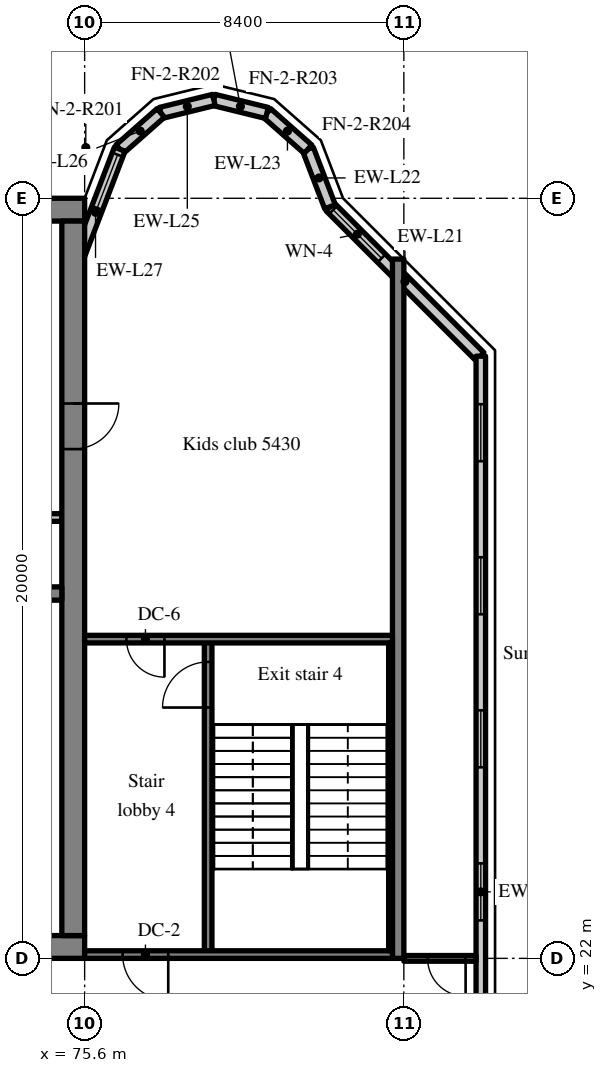
"""IFC4 building model, lengths in metres.
Left out: names, types, materials, properties, quantities, classifications, styles, units other than length and angle.
Written with IfcOpenShell. Run it as: python <this file> out.ifc"""

import sys

from ifc_helpers import new_model, si_unit, direction, frame, frame_2d, origin, place, context, subcontext, project, spatial, rectangle, extrude, source, transform, mapped, element, fill, save


model = new_model("IFC4")
c1 = context("Model", 3, precision=1e-05, world=origin(), true_north=direction((0.0, 1.0)))
c2 = subcontext(c1, "Body", "Model", "MODEL_VIEW")
j1 = project(units=[si_unit("LENGTHUNIT", "METRE"), si_unit("PLANEANGLEUNIT", "RADIAN")], contexts=[c1])
p1 = place(None, origin())
s1 = spatial("IfcSite", under=j1, at=p1, CompositionType="ELEMENT")
p2 = place(p1, origin())
s2 = spatial("IfcBuilding", under=s1, at=p2, CompositionType="ELEMENT")
p3 = place(p2, frame((0.0, 0.0, 225.7)))
s3 = spatial("IfcBuildingStorey", under=s2, at=p3, CompositionType="ELEMENT", Elevation=225.7)
m1 = source(origin(), c2, "Body", "SweptSolid", [
    extrude(rectangle(XDim=50.4, YDim=0.6, at=frame_2d((25.2, 0.0))), origin(), (0.0, 0.0, 1.0), 3.62),
])
p4 = place(p3, frame((25.2, 22.3, 0.0), z_axis=(0.0, 0.0, 1.0), x_axis=(1.0, 0.0, 0.0)))
e1 = element("IfcWall", 1, at=p4, inside=s3, PredefinedType="SHEAR", context=c2, shape_type="MappedRepresentation", body=[
    mapped(m1, transform((0.0, 0.0, 0.0), scale=1.0)),
])
m2 = source(origin(), c2, "Body", "SweptSolid", [
    extrude(rectangle(XDim=1.8, YDim=2.1, at=frame_2d((0.9, 1.05))), frame((0.0, 0.31, 0.0), z_axis=(0.0, -1.0, 0.0), x_axis=(1.0, 0.0, 0.0)), (0.0, 0.0, 1.0), 0.62),
])
p5 = place(p4, frame((15.9, 0.0, 0.0)))
e2 = element("IfcOpeningElement", 2, at=p5, cuts=e1, PredefinedType="OPENING", context=c2, shape_type="MappedRepresentation", body=[
    mapped(m2, transform((0.0, 0.0, 0.0), scale=1.0)),
])
m3 = source(origin(), c2, "Body", "SweptSolid", [
    extrude(rectangle(XDim=0.9, YDim=2.1, at=frame_2d((0.45, 1.05))), frame((0.0, 0.31, 0.0), z_axis=(0.0, -1.0, 0.0), x_axis=(1.0, 0.0, 0.0)), (0.0, 0.0, 1.0), 0.62),
])
p6 = place(p4, frame((11.187, 0.0, 0.0)))
e3 = element("IfcOpeningElement", 3, at=p6, cuts=e1, PredefinedType="OPENING", context=c2, shape_type="MappedRepresentation", body=[
    mapped(m3, transform((0.0, 0.0, 0.0), scale=1.0)),
])
p7 = place(p4, frame((21.513, 0.0, 0.0)))
e4 = element("IfcOpeningElement", 4, at=p7, cuts=e1, PredefinedType="OPENING", context=c2, shape_type="MappedRepresentation", body=[
    mapped(m3, transform((0.0, 0.0, 0.0), scale=1.0)),
])
p8 = place(p4, frame((32.7, 0.0, 0.0)))
e5 = element("IfcOpeningElement", 5, at=p8, cuts=e1, PredefinedType="OPENING", context=c2, shape_type="MappedRepresentation", body=[
    mapped(m2, transform((0.0, 0.0, 0.0), scale=1.0)),
])
m4 = source(origin(), c2, "Body", "SweptSolid", [
    extrude(rectangle(XDim=1.2, YDim=2.1, at=frame_2d((0.6, 1.05))), frame((0.0, 0.31, 0.0), z_axis=(0.0, -1.0, 0.0), x_axis=(1.0, 0.0, 0.0)), (0.0, 0.0, 1.0), 0.62),
])
p9 = place(p4, frame((6.488, 0.0, 0.0)))
e6 = element("IfcOpeningElement", 6, at=p9, cuts=e1, PredefinedType="OPENING", context=c2, shape_type="MappedRepresentation", body=[
    mapped(m4, transform((0.0, 0.0, 0.0), scale=1.0)),
])
p10 = place(p4, frame((47.925, 0.0, 0.0)))
e7 = element("IfcOpeningElement", 7, at=p10, cuts=e1, PredefinedType="OPENING", context=c2, shape_type="MappedRepresentation", body=[
    mapped(m4, transform((0.0, 0.0, 0.0), scale=1.0)),
])
p11 = place(p3, frame((25.2, 41.7, 0.0), z_axis=(0.0, 0.0, 1.0), x_axis=(1.0, 0.0, 0.0)))
e8 = element("IfcWall", 8, at=p11, inside=s3, PredefinedType="SHEAR", context=c2, shape_type="MappedRepresentation", body=[
    mapped(m1, transform((0.0, 0.0, 0.0), scale=1.0)),
])
m5 = source(origin(), c2, "Body", "SweptSolid", [
    extrude(rectangle(XDim=18.8, YDim=0.6, at=frame_2d((9.4, 0.0))), origin(), (0.0, 0.0, 1.0), 3.62),
])
p12 = place(p3, frame((75.3, 22.6, 0.0), z_axis=(0.0, 0.0, 1.0), x_axis=(0.0, 1.0, 0.0)))
e9 = element("IfcWall", 9, at=p12, inside=s3, PredefinedType="SHEAR", context=c2, shape_type="MappedRepresentation", body=[
    mapped(m5, transform((0.0, 0.0, 0.0), scale=1.0)),
])
p13 = place(p12, frame((12.8, 0.0, 0.0)))
e10 = element("IfcOpeningElement", 10, at=p13, cuts=e9, PredefinedType="OPENING", context=c2, shape_type="MappedRepresentation", body=[
    mapped(m4, transform((0.0, 0.0, 0.0), scale=1.0)),
])
m6 = source(origin(), c2, "Body", "SweptSolid", [
    extrude(rectangle(XDim=7.625, YDim=0.35, at=frame_2d((3.812, 0.0))), origin(), (0.0, 0.0, 1.0), 3.62),
])
p14 = place(p3, frame((67.375, 31.6, 0.0), z_axis=(0.0, 0.0, 1.0), x_axis=(1.0, 0.0, 0.0)))
e11 = element("IfcWall", 11, at=p14, inside=s3, PredefinedType="SHEAR", context=c2, shape_type="MappedRepresentation", body=[
    mapped(m6, transform((0.0, 0.0, 0.0), scale=1.0)),
])
m7 = source(origin(), c2, "Body", "SweptSolid", [
    extrude(rectangle(XDim=1.1, YDim=2.1, at=frame_2d((0.55, 1.05))), frame((0.0, 0.185, 0.0), z_axis=(0.0, -1.0, 0.0), x_axis=(1.0, 0.0, 0.0)), (0.0, 0.0, 1.0), 0.37),
])
p15 = place(p14, frame((5.8, 0.0, 0.0)))
e12 = element("IfcOpeningElement", 12, at=p15, cuts=e11, PredefinedType="OPENING", context=c2, shape_type="MappedRepresentation", body=[
    mapped(m7, transform((0.0, 0.0, 0.0), scale=1.0)),
])
m8 = source(origin(), c2, "Body", "SweptSolid", [
    extrude(rectangle(XDim=18.4, YDim=0.3, at=frame_2d((9.2, 0.0))), origin(), (0.0, 0.0, 1.0), 3.62),
])
p16 = place(p3, frame((83.85, 22.0, 0.0), z_axis=(0.0, 0.0, 1.0), x_axis=(0.0, 1.0, 0.0)))
e13 = element("IfcWall", 13, at=p16, inside=s3, PredefinedType="SHEAR", context=c2, shape_type="MappedRepresentation", body=[
    mapped(m8, transform((0.0, 0.0, 0.0), scale=1.0)),
])
m9 = source(origin(), c2, "Body", "SweptSolid", [
    extrude(rectangle(XDim=5.576, YDim=0.3, at=frame_2d((2.788, 0.0))), origin(), (0.0, 0.0, 1.0), 3.62),
])
p17 = place(p3, frame((86.0, 37.834, 0.0), z_axis=(0.0, 0.0, 1.0), x_axis=(-0.707106781187, 0.707106781187, 0.0)))
e14 = element("IfcWall", 14, at=p17, inside=s3, PredefinedType="SOLIDWALL", context=c2, shape_type="MappedRepresentation", body=[
    mapped(m9, transform((0.0, 0.0, 0.0), scale=1.0)),
])
m10 = source(origin(), c2, "Body", "SweptSolid", [
    extrude(rectangle(XDim=1.8, YDim=1.5, at=frame_2d((0.9, 0.75))), frame((0.0, 0.16, 0.0), z_axis=(0.0, -1.0, 0.0), x_axis=(1.0, 0.0, 0.0)), (0.0, 0.0, 1.0), 0.32),
])
p18 = place(p17, frame((3.658, 0.0, 0.9)))
e15 = element("IfcOpeningElement", 15, at=p18, cuts=e14, PredefinedType="OPENING", context=c2, shape_type="MappedRepresentation", body=[
    mapped(m10, transform((0.0, 0.0, 0.0), scale=1.0)),
])
m11 = source(origin(), c2, "Body", "SweptSolid", [
    extrude(rectangle(XDim=1.622, YDim=0.3, at=frame_2d((0.811, 0.0))), origin(), (0.0, 0.0, 1.0), 3.62),
])
p19 = place(p3, frame((82.057, 41.777, 0.0), z_axis=(0.0, 0.0, 1.0), x_axis=(-0.357778527068, 0.933806471154, 0.0)))
e16 = element("IfcWall", 16, at=p19, inside=s3, PredefinedType="SOLIDWALL", context=c2, shape_type="MappedRepresentation", body=[
    mapped(m11, transform((0.0, 0.0, 0.0), scale=1.0)),
])
m12 = source(origin(), c2, "Body", "SweptSolid", [
    extrude(rectangle(XDim=1.44, YDim=0.3, at=frame_2d((0.72, 0.0))), origin(), (0.0, 0.0, 1.0), 3.62),
])
p20 = place(p3, frame((81.477, 43.292, 0.0), z_axis=(0.0, 0.0, 1.0), x_axis=(-0.74957555648, 0.661918790432, 0.0)))
e17 = element("IfcWall", 17, at=p20, inside=s3, PredefinedType="SOLIDWALL", context=c2, shape_type="MappedRepresentation", body=[
    mapped(m12, transform((0.0, 0.0, 0.0), scale=1.0)),
])
m13 = source(origin(), c2, "Body", "SweptSolid", [
    extrude(rectangle(XDim=1.439, YDim=0.3, at=frame_2d((0.719, 0.0))), origin(), (0.0, 0.0, 1.0), 3.62),
])
for number, where, z_axis, x_axis in (
    (18, (80.397, 44.245, 0.0), (0.0, 0.0, 1.0), (-0.971, 0.238, 0.0)),
    (19, (79.0, 44.588, 0.0), (0.0, 0.0, 1.0), (-0.971, -0.238, 0.0)),
):
    element("IfcWall", number, at=place(p3, frame(where, z_axis=z_axis, x_axis=x_axis)), inside=s3, PredefinedType="SOLIDWALL", context=c2, shape_type="MappedRepresentation", body=[
        mapped(m13, transform((0.0, 0.0, 0.0), scale=1.0)),
    ])
p21 = place(p3, frame((77.603, 44.245, 0.0), z_axis=(0.0, 0.0, 1.0), x_axis=(-0.74957555648, -0.661918790432, 0.0)))
e20 = element("IfcWall", 20, at=p21, inside=s3, PredefinedType="SOLIDWALL", context=c2, shape_type="MappedRepresentation", body=[
    mapped(m12, transform((0.0, 0.0, 0.0), scale=1.0)),
])
m14 = source(origin(), c2, "Body", "SweptSolid", [
    extrude(rectangle(XDim=3.559, YDim=0.3, at=frame_2d((1.78, 0.0))), origin(), (0.0, 0.0, 1.0), 3.62),
])
p22 = place(p3, frame((76.523, 43.292, 0.0), z_axis=(0.0, 0.0, 1.0), x_axis=(-0.35779745313, -0.933799219604, 0.0)))
e21 = element("IfcWall", 21, at=p22, inside=s3, PredefinedType="SOLIDWALL", context=c2, shape_type="MappedRepresentation", body=[
    mapped(m14, transform((0.0, 0.0, 0.0), scale=1.0)),
])
m15 = source(origin(), c2, "Body", "SweptSolid", [
    extrude(rectangle(XDim=1.5, YDim=2.0, at=frame_2d((0.75, 1.0))), frame((0.0, 0.16, 0.0), z_axis=(0.0, -1.0, 0.0), x_axis=(1.0, 0.0, 0.0)), (0.0, 0.0, 1.0), 0.32),
])
p23 = place(p22, frame((0.156, 0.0, 0.9)))
e22 = element("IfcOpeningElement", 22, at=p23, cuts=e21, PredefinedType="OPENING", context=c2, shape_type="MappedRepresentation", body=[
    mapped(m15, transform((0.0, 0.0, 0.0), scale=1.0)),
])
m16 = source(origin(), c2, "Body", "SweptSolid", [
    extrude(rectangle(XDim=28.189, YDim=0.25, at=frame_2d((14.095, 0.0))), origin(), (0.0, 0.0, 1.0), 3.62),
])
p24 = place(p3, frame((86.025, 9.655, 0.0), z_axis=(0.0, 0.0, 1.0), x_axis=(0.0, 1.0, 0.0)))
e23 = element("IfcWall", 23, at=p24, inside=s3, PredefinedType="SOLIDWALL", context=c2, shape_type="MappedRepresentation", body=[
    mapped(m16, transform((0.0, 0.0, 0.0), scale=1.0)),
])
m17 = source(origin(), c2, "Body", "SweptSolid", [
    extrude(rectangle(XDim=1.5, YDim=1.5, at=frame_2d((0.75, 0.75))), frame((0.0, 0.135, 0.0), z_axis=(0.0, -1.0, 0.0), x_axis=(1.0, 0.0, 0.0)), (0.0, 0.0, 1.0), 0.27),
])
p25 = place(p24, frame((1.263, 0.0, 0.9)))
e24 = element("IfcOpeningElement", 24, at=p25, cuts=e23, PredefinedType="OPENING", context=c2, shape_type="MappedRepresentation", body=[
    mapped(m17, transform((0.0, 0.0, 0.0), scale=1.0)),
])
p26 = place(p24, frame((5.291, 0.0, 0.9)))
e25 = element("IfcOpeningElement", 25, at=p26, cuts=e23, PredefinedType="OPENING", context=c2, shape_type="MappedRepresentation", body=[
    mapped(m17, transform((0.0, 0.0, 0.0), scale=1.0)),
])
p27 = place(p24, frame((9.318, 0.0, 0.9)))
e26 = element("IfcOpeningElement", 26, at=p27, cuts=e23, PredefinedType="OPENING", context=c2, shape_type="MappedRepresentation", body=[
    mapped(m17, transform((0.0, 0.0, 0.0), scale=1.0)),
])
p28 = place(p24, frame((13.345, 0.0, 0.9)))
e27 = element("IfcOpeningElement", 27, at=p28, cuts=e23, PredefinedType="OPENING", context=c2, shape_type="MappedRepresentation", body=[
    mapped(m17, transform((0.0, 0.0, 0.0), scale=1.0)),
])
p29 = place(p24, frame((17.372, 0.0, 0.9)))
e28 = element("IfcOpeningElement", 28, at=p29, cuts=e23, PredefinedType="OPENING", context=c2, shape_type="MappedRepresentation", body=[
    mapped(m17, transform((0.0, 0.0, 0.0), scale=1.0)),
])
p30 = place(p24, frame((21.399, 0.0, 0.9)))
e29 = element("IfcOpeningElement", 29, at=p30, cuts=e23, PredefinedType="OPENING", context=c2, shape_type="MappedRepresentation", body=[
    mapped(m17, transform((0.0, 0.0, 0.0), scale=1.0)),
])
p31 = place(p24, frame((25.426, 0.0, 0.9)))
e30 = element("IfcOpeningElement", 30, at=p31, cuts=e23, PredefinedType="OPENING", context=c2, shape_type="MappedRepresentation", body=[
    mapped(m17, transform((0.0, 0.0, 0.0), scale=1.0)),
])
m18 = source(origin(), c2, "Body", "SweptSolid", [
    extrude(rectangle(XDim=2.55, YDim=0.2, at=frame_2d((1.275, 0.0))), origin(), (0.0, 0.0, 1.0), 3.62),
])
p32 = place(p3, frame((72.45, 33.6, 0.0), z_axis=(0.0, 0.0, 1.0), x_axis=(1.0, 0.0, 0.0)))
e31 = element("IfcWall", 31, at=p32, inside=s3, PredefinedType="SOLIDWALL", context=c2, shape_type="MappedRepresentation", body=[
    mapped(m18, transform((0.0, 0.0, 0.0), scale=1.0)),
])
m19 = source(origin(), c2, "Body", "SweptSolid", [
    extrude(rectangle(XDim=8.3, YDim=0.2, at=frame_2d((4.15, 0.0))), origin(), (0.0, 0.0, 1.0), 3.62),
])
p33 = place(p3, frame((78.85, 22.1, 0.0), z_axis=(0.0, 0.0, 1.0), x_axis=(0.0, 1.0, 0.0)))
e32 = element("IfcWall", 32, at=p33, inside=s3, PredefinedType="SOLIDWALL", context=c2, shape_type="MappedRepresentation", body=[
    mapped(m19, transform((0.0, 0.0, 0.0), scale=1.0)),
])
m20 = source(origin(), c2, "Body", "SweptSolid", [
    extrude(rectangle(XDim=1.2, YDim=2.1, at=frame_2d((0.6, 1.05))), frame((0.0, 0.11, 0.0), z_axis=(0.0, -1.0, 0.0), x_axis=(1.0, 0.0, 0.0)), (0.0, 0.0, 1.0), 0.22),
])
p34 = place(p33, frame((6.5, 0.0, 0.0)))
e33 = element("IfcOpeningElement", 33, at=p34, cuts=e32, PredefinedType="OPENING", context=c2, shape_type="MappedRepresentation", body=[
    mapped(m20, transform((0.0, 0.0, 0.0), scale=1.0)),
])
m21 = source(origin(), c2, "Body", "SweptSolid", [
    extrude(rectangle(XDim=8.1, YDim=0.2, at=frame_2d((4.05, 0.0))), origin(), (0.0, 0.0, 1.0), 3.62),
])
p35 = place(p3, frame((83.7, 22.1, 0.0), z_axis=(0.0, 0.0, 1.0), x_axis=(-1.0, 0.0, 0.0)))
e34 = element("IfcWall", 34, at=p35, inside=s3, PredefinedType="SOLIDWALL", context=c2, shape_type="MappedRepresentation", body=[
    mapped(m21, transform((0.0, 0.0, 0.0), scale=1.0)),
])
p36 = place(p35, frame((5.9, 0.0, 0.0)))
e35 = element("IfcOpeningElement", 35, at=p36, cuts=e34, PredefinedType="OPENING", context=c2, shape_type="MappedRepresentation", body=[
    mapped(m20, transform((0.0, 0.0, 0.0), scale=1.0)),
])
p37 = place(p3, frame((83.7, 30.4, 0.0), z_axis=(0.0, 0.0, 1.0), x_axis=(-1.0, 0.0, 0.0)))
e36 = element("IfcWall", 36, at=p37, inside=s3, PredefinedType="SOLIDWALL", context=c2, shape_type="MappedRepresentation", body=[
    mapped(m21, transform((0.0, 0.0, 0.0), scale=1.0)),
])
m22 = source(origin(), c2, "Body", "SweptSolid", [
    extrude(rectangle(XDim=1.0, YDim=2.1, at=frame_2d((0.5, 1.05))), frame((0.0, 0.11, 0.0), z_axis=(0.0, -1.0, 0.0), x_axis=(1.0, 0.0, 0.0)), (0.0, 0.0, 1.0), 0.22),
])
p38 = place(p37, frame((6.0, 0.0, 0.0)))
e37 = element("IfcOpeningElement", 37, at=p38, cuts=e36, PredefinedType="OPENING", context=c2, shape_type="MappedRepresentation", body=[
    mapped(m22, transform((0.0, 0.0, 0.0), scale=1.0)),
])
m23 = source(origin(), c2, "Body", "SweptSolid", [
    extrude(rectangle(XDim=8.1, YDim=0.1, at=frame_2d((4.05, 0.0))), origin(), (0.0, 0.0, 1.0), 3.62),
])
p39 = place(p3, frame((83.65, 22.2, 0.0), z_axis=(0.0, 0.0, 1.0), x_axis=(0.0, 1.0, 0.0)))
e38 = element("IfcWall", 38, at=p39, inside=s3, PredefinedType="SOLIDWALL", context=c2, shape_type="MappedRepresentation", body=[
    mapped(m23, transform((0.0, 0.0, 0.0), scale=1.0)),
])
m24 = source(origin(), c2, "Body", "SweptSolid", [
    extrude(rectangle(XDim=1.9, YDim=0.15, at=frame_2d((0.95, 0.0))), origin(), (0.0, 0.0, 1.0), 2.92),
])
p40 = place(p3, frame((84.0, 22.0, 0.0), z_axis=(0.0, 0.0, 1.0), x_axis=(1.0, 0.0, 0.0)))
e39 = element("IfcWall", 39, at=p40, inside=s3, PredefinedType="PARTITIONING", context=c2, shape_type="MappedRepresentation", body=[
    mapped(m24, transform((0.0, 0.0, 0.0), scale=1.0)),
])
m25 = source(origin(), c2, "Body", "SweptSolid", [
    extrude(rectangle(XDim=1.0, YDim=2.1, at=frame_2d((0.5, 1.05))), frame((0.0, 0.085, 0.0), z_axis=(0.0, -1.0, 0.0), x_axis=(1.0, 0.0, 0.0)), (0.0, 0.0, 1.0), 0.17),
])
p41 = place(p40, frame((0.625, 0.0, 0.0)))
e40 = element("IfcOpeningElement", 40, at=p41, cuts=e39, PredefinedType="OPENING", context=c2, shape_type="MappedRepresentation", body=[
    mapped(m25, transform((0.0, 0.0, 0.0), scale=1.0)),
])
m26 = source(origin(), c2, "Body", "SweptSolid", [
    extrude(rectangle(XDim=1.8, YDim=1.5, at=frame_2d((0.9, 0.75))), frame((0.0, 0.03, 0.0), z_axis=(0.0, -1.0, 0.0), x_axis=(1.0, 0.0, 0.0)), (0.0, 0.0, 1.0), 0.06),
])
p42 = place(p18, origin())
e41 = element("IfcWindow", 41, at=p42, inside=s3, PartitioningType="SINGLE_PANEL", PredefinedType="WINDOW", context=c2, shape_type="MappedRepresentation", body=[
    mapped(m26, transform((0.0, 0.0, 0.0), scale=1.0)),
])
fill(e15, e41)
m27 = source(origin(), c2, "Body", "SweptSolid", [
    extrude(rectangle(XDim=1.5, YDim=2.0, at=frame_2d((0.75, 1.0))), frame((0.0, 0.03, 0.0), z_axis=(0.0, -1.0, 0.0), x_axis=(1.0, 0.0, 0.0)), (0.0, 0.0, 1.0), 0.06),
])
p43 = place(p23, origin())
e42 = element("IfcWindow", 42, at=p43, inside=s3, PartitioningType="SINGLE_PANEL", PredefinedType="WINDOW", context=c2, shape_type="MappedRepresentation", body=[
    mapped(m27, transform((0.0, 0.0, 0.0), scale=1.0)),
])
fill(e22, e42)
m28 = source(origin(), c2, "Body", "SweptSolid", [
    extrude(rectangle(XDim=1.5, YDim=1.5, at=frame_2d((0.75, 0.75))), frame((0.0, 0.03, 0.0), z_axis=(0.0, -1.0, 0.0), x_axis=(1.0, 0.0, 0.0)), (0.0, 0.0, 1.0), 0.06),
])
p44 = place(p28, origin())
e43 = element("IfcWindow", 43, at=p44, inside=s3, PartitioningType="SINGLE_PANEL", PredefinedType="WINDOW", context=c2, shape_type="MappedRepresentation", body=[
    mapped(m28, transform((0.0, 0.0, 0.0), scale=1.0)),
])
fill(e27, e43)
p45 = place(p29, origin())
e44 = element("IfcWindow", 44, at=p45, inside=s3, PartitioningType="SINGLE_PANEL", PredefinedType="WINDOW", context=c2, shape_type="MappedRepresentation", body=[
    mapped(m28, transform((0.0, 0.0, 0.0), scale=1.0)),
])
fill(e28, e44)
p46 = place(p30, origin())
e45 = element("IfcWindow", 45, at=p46, inside=s3, PartitioningType="SINGLE_PANEL", PredefinedType="WINDOW", context=c2, shape_type="MappedRepresentation", body=[
    mapped(m28, transform((0.0, 0.0, 0.0), scale=1.0)),
])
fill(e29, e45)
p47 = place(p31, origin())
e46 = element("IfcWindow", 46, at=p47, inside=s3, PartitioningType="SINGLE_PANEL", PredefinedType="WINDOW", context=c2, shape_type="MappedRepresentation", body=[
    mapped(m28, transform((0.0, 0.0, 0.0), scale=1.0)),
])
fill(e30, e46)
m29 = source(origin(), c2, "Body", "SweptSolid", [
    extrude(rectangle(XDim=1.2, YDim=2.1, at=frame_2d((0.6, 1.05))), frame((0.0, 0.025, 0.0), z_axis=(0.0, -1.0, 0.0), x_axis=(1.0, 0.0, 0.0)), (0.0, 0.0, 1.0), 0.05),
])
p48 = place(p13, origin())
e47 = element("IfcDoor", 47, at=p48, inside=s3, OperationType="SINGLE_SWING_RIGHT", PredefinedType="DOOR", context=c2, shape_type="MappedRepresentation", body=[
    mapped(m29, transform((0.0, 0.0, 0.0), scale=1.0)),
])
fill(e10, e47)
p49 = place(p34, origin())
e48 = element("IfcDoor", 48, at=p49, inside=s3, OperationType="SINGLE_SWING_LEFT", PredefinedType="DOOR", context=c2, shape_type="MappedRepresentation", body=[
    mapped(m29, transform((0.0, 0.0, 0.0), scale=1.0)),
])
fill(e33, e48)
p50 = place(p36, origin())
e49 = element("IfcDoor", 49, at=p50, inside=s3, OperationType="SINGLE_SWING_LEFT", PredefinedType="DOOR", context=c2, shape_type="MappedRepresentation", body=[
    mapped(m29, transform((0.0, 0.0, 0.0), scale=1.0)),
])
fill(e35, e49)
m30 = source(origin(), c2, "Body", "SweptSolid", [
    extrude(rectangle(XDim=1.0, YDim=2.1, at=frame_2d((0.5, 1.05))), frame((0.0, 0.025, 0.0), z_axis=(0.0, -1.0, 0.0), x_axis=(1.0, 0.0, 0.0)), (0.0, 0.0, 1.0), 0.05),
])
p51 = place(p38, origin())
e50 = element("IfcDoor", 50, at=p51, inside=s3, OperationType="SINGLE_SWING_LEFT", PredefinedType="DOOR", context=c2, shape_type="MappedRepresentation", body=[
    mapped(m30, transform((0.0, 0.0, 0.0), scale=1.0)),
])
fill(e37, e50)
p52 = place(p41, origin())
e51 = element("IfcDoor", 51, at=p52, inside=s3, OperationType="SINGLE_SWING_RIGHT", PredefinedType="DOOR", context=c2, shape_type="MappedRepresentation", body=[
    mapped(m30, transform((0.0, 0.0, 0.0), scale=1.0)),
])
fill(e40, e51)
save(model, sys.argv[1])
